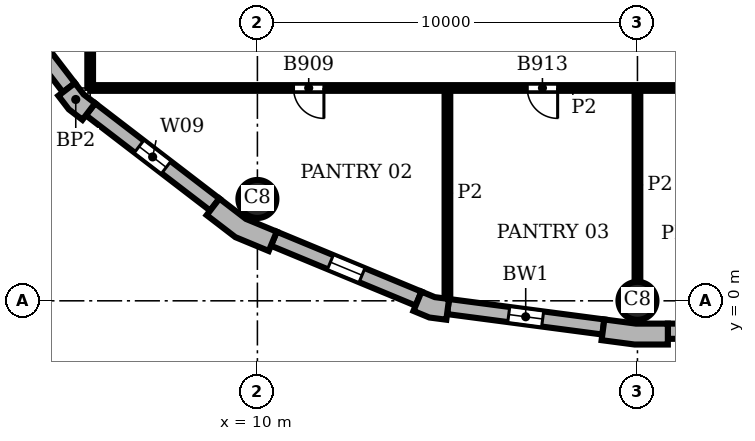
"""IFC4 building model, lengths in metres.
Left out: names, types, materials, properties, quantities, classifications, styles, units other than length and angle.
Written with IfcOpenShell. Run it as: python <this file> out.ifc"""

import sys

from ifc_helpers import new_model, si_unit, direction, frame, frame_2d, origin, origin_2d, place, context, subcontext, project, spatial, polyline, rectangle, circle, outline, extrude, element, fill, save


model = new_model("IFC4")
c1 = context("Model", 3, precision=1e-05, world=origin(), true_north=direction((0.0, 1.0)))
c2 = subcontext(c1, "Body", "Model", "MODEL_VIEW")
j1 = project(units=[si_unit("LENGTHUNIT", "METRE"), si_unit("PLANEANGLEUNIT", "RADIAN")], contexts=[c1])
p1 = place(None, origin())
s1 = spatial("IfcSite", under=j1, at=p1, CompositionType="ELEMENT")
p2 = place(p1, origin())
s2 = spatial("IfcBuilding", under=s1, at=p2, CompositionType="ELEMENT")
p3 = place(p2, frame((0.0, 0.0, 225.3)))
s3 = spatial("IfcBuildingStorey", under=s2, at=p3, CompositionType="ELEMENT", Elevation=225.3)
for number, where, z_axis, x_axis in (
    (1, (20.0, 0.0, 0.0), (0.0, 0.0, 1.0), (1.0, 0.0, 0.0)),
    (2, (10.0, 2.679, 0.0), (0.0, 0.0, 1.0), (1.0, 0.0, 0.0)),
):
    element("IfcColumn", number, at=place(p3, frame(where, z_axis=z_axis, x_axis=x_axis)), inside=s3, PredefinedType="COLUMN", context=c2, shape_type="SweptSolid", body=[
        extrude(circle(Radius=0.5, at=origin_2d()), origin(), (0.0, 0.0, 1.0), 3.9),
    ])
p4 = place(p3, origin())
e3 = element("IfcWall", 3, at=p4, inside=s3, PredefinedType="SOLIDWALL", context=c2, shape_type="SweptSolid", body=[
    extrude(outline(polyline([(19.076, -0.887), (19.057, -1.036), (19.925, -1.15), (20.8, -1.15), (20.8, -1.0), (20.8, -0.6), (19.961, -0.6), (19.128, -0.49), (19.076, -0.887)])), origin(), (0.0, 0.0, 1.0), 3.9),
])
e4 = element("IfcWall", 4, at=p4, inside=s3, PredefinedType="SOLIDWALL", context=c2, shape_type="SweptSolid", body=[
    extrude(outline(polyline([(4.882, 5.487), (4.763, 5.396), (5.038, 5.038), (5.396, 4.763), (5.487, 4.882), (5.731, 5.199), (5.43, 5.43), (5.199, 5.731), (4.882, 5.487)])), origin(), (0.0, 0.0, 1.0), 3.9),
])
e5 = element("IfcWall", 5, at=p4, inside=s3, PredefinedType="SOLIDWALL", context=c2, shape_type="SweptSolid", body=[
    extrude(outline(polyline([(8.757, 2.373), (8.665, 2.254), (9.42, 1.675), (10.299, 1.311), (10.356, 1.449), (10.51, 1.819), (9.698, 2.155), (9.0, 2.69), (8.757, 2.373)])), origin(), (0.0, 0.0, 1.0), 3.9),
])
e6 = element("IfcWall", 6, at=p4, inside=s3, PredefinedType="SOLIDWALL", context=c2, shape_type="SweptSolid", body=[
    extrude(outline(polyline([(14.164, -0.128), (14.106, -0.266), (14.523, -0.439), (14.971, -0.498), (14.99, -0.349), (15.043, 0.047), (14.667, 0.097), (14.317, 0.242), (14.164, -0.128)])), origin(), (0.0, 0.0, 1.0), 3.9),
])
p5 = place(p3, frame((20.8, -0.8, 0.0), z_axis=(0.0, 0.0, 1.0), x_axis=(1.0, 0.0, 0.0)))
e7 = element("IfcWall", 7, at=p5, inside=s3, PredefinedType="SOLIDWALL", context=c2, shape_type="SweptSolid", body=[
    extrude(rectangle(XDim=38.4, YDim=0.4, at=frame_2d((19.2, 0.0))), origin(), (0.0, 0.0, 1.0), 3.9),
])
p6 = place(p5, frame((3.75, 0.0, 0.9)))
e8 = element("IfcOpeningElement", 8, at=p6, cuts=e7, PredefinedType="OPENING", context=c2, shape_type="SweptSolid", body=[
    extrude(rectangle(XDim=0.9, YDim=2.35, at=frame_2d((0.45, 1.175))), frame((0.0, 0.21, 0.0), z_axis=(0.0, -1.0, 0.0), x_axis=(1.0, 0.0, 0.0)), (0.0, 0.0, 1.0), 0.42),
])
p7 = place(p5, frame((13.75, 0.0, 0.9)))
e9 = element("IfcOpeningElement", 9, at=p7, cuts=e7, PredefinedType="OPENING", context=c2, shape_type="SweptSolid", body=[
    extrude(rectangle(XDim=0.9, YDim=2.35, at=frame_2d((0.45, 1.175))), frame((0.0, 0.21, 0.0), z_axis=(0.0, -1.0, 0.0), x_axis=(1.0, 0.0, 0.0)), (0.0, 0.0, 1.0), 0.42),
])
p8 = place(p5, frame((23.75, 0.0, 0.9)))
e10 = element("IfcOpeningElement", 10, at=p8, cuts=e7, PredefinedType="OPENING", context=c2, shape_type="SweptSolid", body=[
    extrude(rectangle(XDim=0.9, YDim=2.35, at=frame_2d((0.45, 1.175))), frame((0.0, 0.21, 0.0), z_axis=(0.0, -1.0, 0.0), x_axis=(1.0, 0.0, 0.0)), (0.0, 0.0, 1.0), 0.42),
])
p9 = place(p5, frame((33.75, 0.0, 0.9)))
e11 = element("IfcOpeningElement", 11, at=p9, cuts=e7, PredefinedType="OPENING", context=c2, shape_type="SweptSolid", body=[
    extrude(rectangle(XDim=0.9, YDim=2.35, at=frame_2d((0.45, 1.175))), frame((0.0, 0.21, 0.0), z_axis=(0.0, -1.0, 0.0), x_axis=(1.0, 0.0, 0.0)), (0.0, 0.0, 1.0), 0.42),
])
p10 = place(p3, frame((2.532, 8.878, 0.0), z_axis=(0.0, 0.0, 1.0), x_axis=(0.608759824817, -0.793354571229, 0.0)))
e12 = element("IfcWall", 12, at=p10, inside=s3, PredefinedType="SOLIDWALL", context=c2, shape_type="SweptSolid", body=[
    extrude(rectangle(XDim=4.121, YDim=0.4, at=frame_2d((2.061, 0.0))), origin(), (0.0, 0.0, 1.0), 3.9),
])
p11 = place(p10, frame((1.611, 0.0, 0.9)))
e13 = element("IfcOpeningElement", 13, at=p11, cuts=e12, PredefinedType="OPENING", context=c2, shape_type="SweptSolid", body=[
    extrude(rectangle(XDim=0.9, YDim=2.35, at=frame_2d((0.45, 1.175))), frame((0.0, 0.21, 0.0), z_axis=(0.0, -1.0, 0.0), x_axis=(1.0, 0.0, 0.0)), (0.0, 0.0, 1.0), 0.42),
])
p12 = place(p3, frame((5.609, 5.041, 0.0), z_axis=(0.0, 0.0, 1.0), x_axis=(0.793354571229, -0.608759824817, 0.0)))
e14 = element("IfcWall", 14, at=p12, inside=s3, PredefinedType="SOLIDWALL", context=c2, shape_type="SweptSolid", body=[
    extrude(rectangle(XDim=4.121, YDim=0.4, at=frame_2d((2.061, 0.0))), origin(), (0.0, 0.0, 1.0), 3.9),
])
p13 = place(p12, frame((1.611, 0.0, 0.9)))
e15 = element("IfcOpeningElement", 15, at=p13, cuts=e14, PredefinedType="OPENING", context=c2, shape_type="SweptSolid", body=[
    extrude(rectangle(XDim=0.9, YDim=2.35, at=frame_2d((0.45, 1.175))), frame((0.0, 0.21, 0.0), z_axis=(0.0, -1.0, 0.0), x_axis=(1.0, 0.0, 0.0)), (0.0, 0.0, 1.0), 0.42),
])
p14 = place(p3, frame((10.433, 1.634, 0.0), z_axis=(0.0, 0.0, 1.0), x_axis=(0.923863744394, -0.382721546029, 0.0)))
e16 = element("IfcWall", 16, at=p14, inside=s3, PredefinedType="SOLIDWALL", context=c2, shape_type="SweptSolid", body=[
    extrude(rectangle(XDim=4.121, YDim=0.4, at=frame_2d((2.061, 0.0))), origin(), (0.0, 0.0, 1.0), 3.9),
])
p15 = place(p14, frame((1.611, 0.0, 0.9)))
e17 = element("IfcOpeningElement", 17, at=p15, cuts=e16, PredefinedType="OPENING", context=c2, shape_type="SweptSolid", body=[
    extrude(rectangle(XDim=0.9, YDim=2.35, at=frame_2d((0.45, 1.175))), frame((0.0, 0.21, 0.0), z_axis=(0.0, -1.0, 0.0), x_axis=(1.0, 0.0, 0.0)), (0.0, 0.0, 1.0), 0.42),
])
p16 = place(p3, frame((15.017, -0.151, 0.0), z_axis=(0.0, 0.0, 1.0), x_axis=(0.991446429508, -0.130514280502, 0.0)))
e18 = element("IfcWall", 18, at=p16, inside=s3, PredefinedType="SOLIDWALL", context=c2, shape_type="SweptSolid", body=[
    extrude(rectangle(XDim=4.121, YDim=0.4, at=frame_2d((2.061, 0.0))), origin(), (0.0, 0.0, 1.0), 3.9),
])
p17 = place(p16, frame((1.611, 0.0, 0.9)))
e19 = element("IfcOpeningElement", 19, at=p17, cuts=e18, PredefinedType="OPENING", context=c2, shape_type="SweptSolid", body=[
    extrude(rectangle(XDim=0.9, YDim=2.35, at=frame_2d((0.45, 1.175))), frame((0.0, 0.21, 0.0), z_axis=(0.0, -1.0, 0.0), x_axis=(1.0, 0.0, 0.0)), (0.0, 0.0, 1.0), 0.42),
])
p18 = place(p3, frame((5.6, 5.6, 0.0), z_axis=(0.0, 0.0, 1.0), x_axis=(0.0, 1.0, 0.0)))
e20 = element("IfcWall", 20, at=p18, inside=s3, PredefinedType="PARTITIONING", context=c2, shape_type="SweptSolid", body=[
    extrude(rectangle(XDim=22.4, YDim=0.15, at=frame_2d((11.2, 0.0))), origin(), (0.0, 0.0, 1.0), 3.58),
])
p19 = place(p18, frame((5.35, 0.0, 0.0)))
e21 = element("IfcOpeningElement", 21, at=p19, cuts=e20, PredefinedType="OPENING", context=c2, shape_type="SweptSolid", body=[
    extrude(rectangle(XDim=0.8, YDim=2.1, at=frame_2d((0.4, 1.05))), frame((0.0, 0.085, 0.0), z_axis=(0.0, -1.0, 0.0), x_axis=(1.0, 0.0, 0.0)), (0.0, 0.0, 1.0), 0.17),
])
p20 = place(p18, frame((11.5, 0.0, 0.0)))
e22 = element("IfcOpeningElement", 22, at=p20, cuts=e20, PredefinedType="OPENING", context=c2, shape_type="SweptSolid", body=[
    extrude(rectangle(XDim=0.8, YDim=2.1, at=frame_2d((0.4, 1.05))), frame((0.0, 0.085, 0.0), z_axis=(0.0, -1.0, 0.0), x_axis=(1.0, 0.0, 0.0)), (0.0, 0.0, 1.0), 0.17),
])
p21 = place(p18, frame((17.75, 0.0, 0.0)))
e23 = element("IfcOpeningElement", 23, at=p21, cuts=e20, PredefinedType="OPENING", context=c2, shape_type="SweptSolid", body=[
    extrude(rectangle(XDim=1.8, YDim=2.1, at=frame_2d((0.9, 1.05))), frame((0.0, 0.085, 0.0), z_axis=(0.0, -1.0, 0.0), x_axis=(1.0, 0.0, 0.0)), (0.0, 0.0, 1.0), 0.17),
])
p22 = place(p3, frame((15.0, 0.063, 0.0), z_axis=(0.0, 0.0, 1.0), x_axis=(0.0, 1.0, 0.0)))
e24 = element("IfcWall", 24, at=p22, inside=s3, PredefinedType="PARTITIONING", context=c2, shape_type="SweptSolid", body=[
    extrude(rectangle(XDim=5.537, YDim=0.15, at=frame_2d((2.769, 0.0))), origin(), (0.0, 0.0, 1.0), 3.58),
])
p23 = place(p3, frame((20.0, 0.5, 0.0), z_axis=(0.0, 0.0, 1.0), x_axis=(0.0, 1.0, 0.0)))
e25 = element("IfcWall", 25, at=p23, inside=s3, PredefinedType="PARTITIONING", context=c2, shape_type="SweptSolid", body=[
    extrude(rectangle(XDim=5.1, YDim=0.15, at=frame_2d((2.55, 0.0))), origin(), (0.0, 0.0, 1.0), 3.58),
])
p24 = place(p3, frame((5.6, 5.6, 0.0), z_axis=(0.0, 0.0, 1.0), x_axis=(1.0, 0.0, 0.0)))
e26 = element("IfcWall", 26, at=p24, inside=s3, PredefinedType="PARTITIONING", context=c2, shape_type="SweptSolid", body=[
    extrude(rectangle(XDim=25.4, YDim=0.15, at=frame_2d((12.7, 0.0))), origin(), (0.0, 0.0, 1.0), 3.58),
])
p25 = place(p24, frame((20.75, 0.0, 0.0)))
e27 = element("IfcOpeningElement", 27, at=p25, cuts=e26, PredefinedType="OPENING", context=c2, shape_type="SweptSolid", body=[
    extrude(rectangle(XDim=1.0, YDim=2.1, at=frame_2d((0.5, 1.05))), frame((0.0, 0.085, 0.0), z_axis=(0.0, -1.0, 0.0), x_axis=(1.0, 0.0, 0.0)), (0.0, 0.0, 1.0), 0.17),
])
p26 = place(p24, frame((5.35, 0.0, 0.0)))
e28 = element("IfcOpeningElement", 28, at=p26, cuts=e26, PredefinedType="OPENING", context=c2, shape_type="SweptSolid", body=[
    extrude(rectangle(XDim=0.8, YDim=2.1, at=frame_2d((0.4, 1.05))), frame((0.0, 0.085, 0.0), z_axis=(0.0, -1.0, 0.0), x_axis=(1.0, 0.0, 0.0)), (0.0, 0.0, 1.0), 0.17),
])
p27 = place(p24, frame((11.5, 0.0, 0.0)))
e29 = element("IfcOpeningElement", 29, at=p27, cuts=e26, PredefinedType="OPENING", context=c2, shape_type="SweptSolid", body=[
    extrude(rectangle(XDim=0.8, YDim=2.1, at=frame_2d((0.4, 1.05))), frame((0.0, 0.085, 0.0), z_axis=(0.0, -1.0, 0.0), x_axis=(1.0, 0.0, 0.0)), (0.0, 0.0, 1.0), 0.17),
])
p28 = place(p13, origin())
e30 = element("IfcWindow", 30, at=p28, inside=s3, PartitioningType="SINGLE_PANEL", PredefinedType="WINDOW", context=c2, shape_type="SweptSolid", body=[
    extrude(rectangle(XDim=0.9, YDim=2.35, at=frame_2d((0.45, 1.175))), frame((0.0, 0.16, 0.0), z_axis=(0.0, -1.0, 0.0), x_axis=(1.0, 0.0, 0.0)), (0.0, 0.0, 1.0), 0.06),
])
fill(e15, e30)
p29 = place(p15, origin())
e31 = element("IfcWindow", 31, at=p29, inside=s3, PartitioningType="SINGLE_PANEL", PredefinedType="WINDOW", context=c2, shape_type="SweptSolid", body=[
    extrude(rectangle(XDim=0.9, YDim=2.35, at=frame_2d((0.45, 1.175))), frame((0.0, 0.16, 0.0), z_axis=(0.0, -1.0, 0.0), x_axis=(1.0, 0.0, 0.0)), (0.0, 0.0, 1.0), 0.06),
])
fill(e17, e31)
p30 = place(p17, origin())
e32 = element("IfcWindow", 32, at=p30, inside=s3, PartitioningType="SINGLE_PANEL", PredefinedType="WINDOW", context=c2, shape_type="SweptSolid", body=[
    extrude(rectangle(XDim=0.9, YDim=2.35, at=frame_2d((0.45, 1.175))), frame((0.0, 0.16, 0.0), z_axis=(0.0, -1.0, 0.0), x_axis=(1.0, 0.0, 0.0)), (0.0, 0.0, 1.0), 0.06),
])
fill(e19, e32)
p31 = place(p26, frame((0.8, 0.0, 0.0), z_axis=(0.0, 0.0, 1.0), x_axis=(-1.0, 0.0, 0.0)))
e33 = element("IfcDoor", 33, at=p31, inside=s3, OperationType="SINGLE_SWING_LEFT", PredefinedType="DOOR", context=c2, shape_type="SweptSolid", body=[
    extrude(rectangle(XDim=0.8, YDim=2.1, at=frame_2d((0.4, 1.05))), frame((0.0, 0.025, 0.0), z_axis=(0.0, -1.0, 0.0), x_axis=(1.0, 0.0, 0.0)), (0.0, 0.0, 1.0), 0.05),
])
fill(e28, e33)
p32 = place(p27, frame((0.8, 0.0, 0.0), z_axis=(0.0, 0.0, 1.0), x_axis=(-1.0, 0.0, 0.0)))
e34 = element("IfcDoor", 34, at=p32, inside=s3, OperationType="SINGLE_SWING_LEFT", PredefinedType="DOOR", context=c2, shape_type="SweptSolid", body=[
    extrude(rectangle(XDim=0.8, YDim=2.1, at=frame_2d((0.4, 1.05))), frame((0.0, 0.025, 0.0), z_axis=(0.0, -1.0, 0.0), x_axis=(1.0, 0.0, 0.0)), (0.0, 0.0, 1.0), 0.05),
])
fill(e29, e34)
save(model, sys.argv[1])
